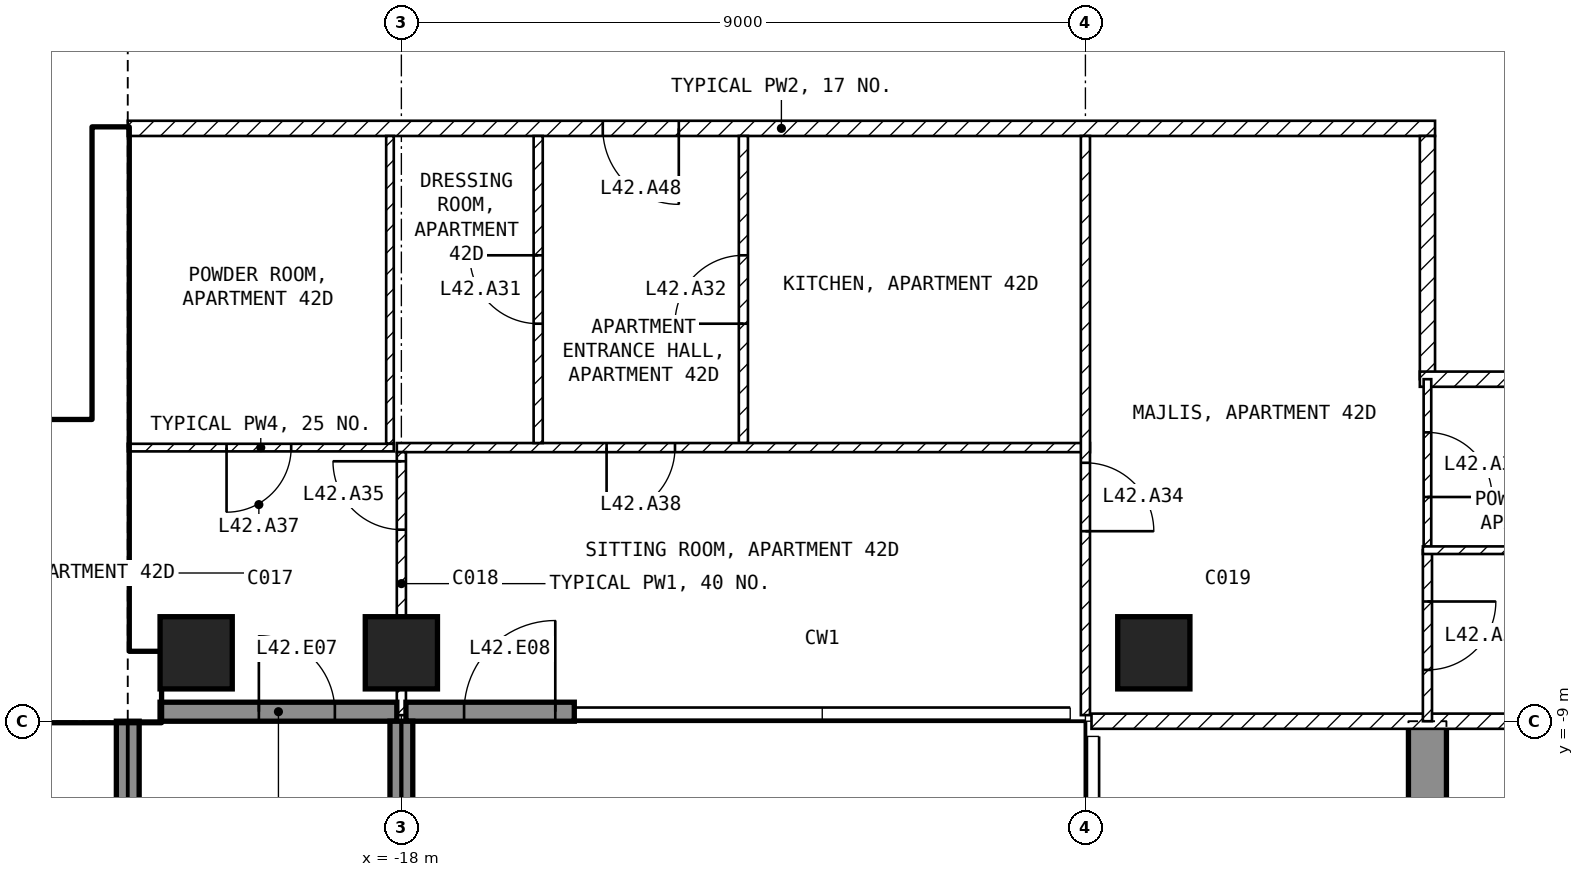
"""IFC4 building model, lengths in metres.
Left out: names, types, materials, properties, quantities, classifications, styles, units other than length and angle.
Written with IfcOpenShell. Run it as: python <this file> out.ifc"""

import sys

from ifc_helpers import new_model, si_unit, direction, frame, frame_2d, origin, origin_2d, place, context, subcontext, project, spatial, polyline, rectangle, outline, extrude, element, fill, save


model = new_model("IFC4")
c1 = context("Model", 3, precision=1e-05, world=origin(), true_north=direction((0.0, 1.0)))
c2 = subcontext(c1, "Body", "Model", "MODEL_VIEW")
j1 = project(units=[si_unit("LENGTHUNIT", "METRE"), si_unit("PLANEANGLEUNIT", "RADIAN")], contexts=[c1])
p1 = place(None, origin())
s1 = spatial("IfcSite", under=j1, at=p1, CompositionType="ELEMENT")
p2 = place(p1, origin())
s2 = spatial("IfcBuilding", under=s1, at=p2, CompositionType="ELEMENT")
p3 = place(p2, frame((0.0, 0.0, 173.6)))
s3 = spatial("IfcBuildingStorey", under=s2, at=p3, CompositionType="ELEMENT", Elevation=173.6)
for number, where, z_axis, x_axis in (
    (1, (-20.7, -8.1, -0.25), (0.0, 0.0, 1.0), (1.0, 0.0, 0.0)),
    (2, (-18.0, -8.1, -0.25), (0.0, 0.0, 1.0), (1.0, 0.0, 0.0)),
    (3, (-8.1, -8.1, -0.25), (0.0, 0.0, 1.0), (1.0, 0.0, 0.0)),
):
    element("IfcColumn", number, at=place(p3, frame(where, z_axis=z_axis, x_axis=x_axis)), inside=s3, PredefinedType="COLUMN", context=c2, shape_type="SweptSolid", body=[
        extrude(rectangle(XDim=0.95, YDim=0.95, at=origin_2d()), origin(), (0.0, 0.0, 1.0), 3.5),
    ])
p4 = place(p3, frame((-4.75, -20.225, -0.25), z_axis=(1.0, 0.0, 0.0), x_axis=(0.0, 1.0, 0.0)))
e4 = element("IfcWall", 4, at=p4, inside=s3, PredefinedType="SHEAR", context=c2, shape_type="SweptSolid", body=[
    extrude(outline(polyline([(0.0, 0.0), (6.725, 0.0), (6.725, 2.65), (9.125, 2.65), (9.125, 0.0), (11.225, 0.0), (11.225, 3.5), (0.0, 3.5), (0.0, 0.0)])), origin(), (0.0, 0.0, 1.0), 0.5),
])
p5 = place(p3, frame((-21.175, -8.875, 0.0), z_axis=(0.0, 0.0, 1.0), x_axis=(1.0, 0.0, 0.0)))
e5 = element("IfcWall", 5, at=p5, inside=s3, PredefinedType="SOLIDWALL", context=c2, shape_type="SweptSolid", body=[
    extrude(rectangle(XDim=3.115, YDim=0.25, at=frame_2d((1.558, 0.0))), origin(), (0.0, 0.0, 1.0), 3.25),
])
p6 = place(p5, frame((1.3, 0.0, 0.0)))
e6 = element("IfcOpeningElement", 6, at=p6, cuts=e5, PredefinedType="OPENING", context=c2, shape_type="SweptSolid", body=[
    extrude(rectangle(XDim=1.0, YDim=2.4, at=frame_2d((0.5, 1.2))), frame((0.0, 0.135, 0.0), z_axis=(0.0, -1.0, 0.0), x_axis=(1.0, 0.0, 0.0)), (0.0, 0.0, 1.0), 0.27),
])
p7 = place(p3, frame((-17.94, -8.875, 0.0), z_axis=(0.0, 0.0, 1.0), x_axis=(1.0, 0.0, 0.0)))
e7 = element("IfcWall", 7, at=p7, inside=s3, PredefinedType="SOLIDWALL", context=c2, shape_type="SweptSolid", body=[
    extrude(rectangle(XDim=2.215, YDim=0.25, at=frame_2d((1.107, 0.0))), origin(), (0.0, 0.0, 1.0), 3.25),
])
p8 = place(p7, frame((0.765, 0.0, 0.0)))
e8 = element("IfcOpeningElement", 8, at=p8, cuts=e7, PredefinedType="OPENING", context=c2, shape_type="SweptSolid", body=[
    extrude(rectangle(XDim=1.2, YDim=2.4, at=frame_2d((0.6, 1.2))), frame((0.0, 0.135, 0.0), z_axis=(0.0, -1.0, 0.0), x_axis=(1.0, 0.0, 0.0)), (0.0, 0.0, 1.0), 0.27),
])
for number, where, z_axis, x_axis in (
    (9, (-21.6, -9.0, 0.0), (0.0, 0.0, 1.0), (0.0, -1.0, 0.0)),
    (10, (-18.0, -9.0, 0.0), (0.0, 0.0, 1.0), (0.0, -1.0, 0.0)),
):
    element("IfcWall", number, at=place(p3, frame(where, z_axis=z_axis, x_axis=x_axis)), inside=s3, PredefinedType="SOLIDWALL", context=c2, shape_type="SweptSolid", body=[
        extrude(rectangle(XDim=2.7, YDim=0.3, at=frame_2d((1.35, 0.0))), origin(), (0.0, 0.0, 1.0), 3.25),
    ])
p9 = place(p3, frame((-30.2, -8.55, 0.0), z_axis=(0.0, 0.0, 1.0), x_axis=(1.0, 0.0, 0.0)))
e11 = element("IfcWall", 11, at=p9, inside=s3, PredefinedType="SHEAR", context=c2, shape_type="SweptSolid", body=[
    extrude(rectangle(XDim=9.025, YDim=0.9, at=frame_2d((4.512, 0.0))), origin(), (0.0, 0.0, 1.0), 3.25),
])
p10 = place(p3, frame((-21.825, -8.1, 0.0), z_axis=(0.0, 0.0, 1.0), x_axis=(0.0, 1.0, 0.0)))
e12 = element("IfcWall", 12, at=p10, inside=s3, PredefinedType="SHEAR", context=c2, shape_type="SweptSolid", body=[
    extrude(rectangle(XDim=6.9, YDim=0.45, at=frame_2d((3.45, 0.0))), origin(), (0.0, 0.0, 1.0), 3.25),
])
p11 = place(p3, frame((-28.35, -5.15, 0.0), z_axis=(0.0, 0.0, 1.0), x_axis=(1.0, 0.0, 0.0)))
e13 = element("IfcWall", 13, at=p11, inside=s3, PredefinedType="SOLIDWALL", context=c2, shape_type="SweptSolid", body=[
    extrude(rectangle(XDim=6.3, YDim=0.2, at=frame_2d((3.15, 0.0))), origin(), (0.0, 0.0, 1.0), 3.25),
])
p12 = place(p11, frame((5.1, 0.0, 0.0)))
e14 = element("IfcOpeningElement", 14, at=p12, cuts=e13, PredefinedType="OPENING", context=c2, shape_type="SweptSolid", body=[
    extrude(rectangle(XDim=1.0, YDim=2.1, at=frame_2d((0.5, 1.05))), frame((0.0, 0.11, 0.0), z_axis=(0.0, -1.0, 0.0), x_axis=(1.0, 0.0, 0.0)), (0.0, 0.0, 1.0), 0.22),
])
p13 = place(p3, frame((-4.4, -1.2, 0.0), z_axis=(0.0, 0.0, 1.0), x_axis=(-1.0, 0.0, 0.0)))
e15 = element("IfcWall", 15, at=p13, inside=s3, PredefinedType="PARTITIONING", context=c2, shape_type="SweptSolid", body=[
    extrude(rectangle(XDim=17.2, YDim=0.2, at=frame_2d((8.6, 0.0))), origin(), (0.0, 0.0, 1.0), 3.25),
])
p14 = place(p13, frame((9.95, 0.0, 0.0)))
e16 = element("IfcOpeningElement", 16, at=p14, cuts=e15, PredefinedType="OPENING", context=c2, shape_type="SweptSolid", body=[
    extrude(rectangle(XDim=1.0, YDim=2.1, at=frame_2d((0.5, 1.05))), frame((0.0, 0.11, 0.0), z_axis=(0.0, -1.0, 0.0), x_axis=(1.0, 0.0, 0.0)), (0.0, 0.0, 1.0), 0.22),
])
p15 = place(p3, frame((-4.5, -4.5, 0.0), z_axis=(0.0, 0.0, 1.0), x_axis=(0.0, 1.0, 0.0)))
e17 = element("IfcWall", 17, at=p15, inside=s3, PredefinedType="PARTITIONING", context=c2, shape_type="SweptSolid", body=[
    extrude(rectangle(XDim=3.2, YDim=0.2, at=frame_2d((1.6, 0.0))), origin(), (0.0, 0.0, 1.0), 3.25),
])
p16 = place(p3, frame((-1.1, -4.5, 0.0), z_axis=(0.0, 0.0, 1.0), x_axis=(-1.0, 0.0, 0.0)))
e18 = element("IfcWall", 18, at=p16, inside=s3, PredefinedType="PARTITIONING", context=c2, shape_type="SweptSolid", body=[
    extrude(rectangle(XDim=3.5, YDim=0.2, at=frame_2d((1.75, 0.0))), origin(), (0.0, 0.0, 1.0), 3.25),
])
p17 = place(p3, frame((8.92, -9.0, 0.0), z_axis=(0.0, 0.0, 1.0), x_axis=(-1.0, 0.0, 0.0)))
e19 = element("IfcWall", 19, at=p17, inside=s3, PredefinedType="PARTITIONING", context=c2, shape_type="SweptSolid", body=[
    extrude(rectangle(XDim=17.84, YDim=0.2, at=frame_2d((8.92, 0.0))), origin(), (0.0, 0.0, 1.0), 3.25),
])
p18 = place(p17, frame((8.42, 0.0, 0.0)))
e20 = element("IfcOpeningElement", 20, at=p18, cuts=e19, PredefinedType="OPENING", context=c2, shape_type="SweptSolid", body=[
    extrude(rectangle(XDim=1.0, YDim=2.1, at=frame_2d((0.5, 1.05))), frame((0.0, 0.11, 0.0), z_axis=(0.0, -1.0, 0.0), x_axis=(1.0, 0.0, 0.0)), (0.0, 0.0, 1.0), 0.22),
])
p19 = place(p3, frame((-13.5, -5.34, 0.0), z_axis=(0.0, 0.0, 1.0), x_axis=(0.0, 1.0, 0.0)))
e21 = element("IfcWall", 21, at=p19, inside=s3, PredefinedType="PARTITIONING", context=c2, shape_type="SweptSolid", body=[
    extrude(rectangle(XDim=4.04, YDim=0.12, at=frame_2d((2.02, 0.0))), origin(), (0.0, 0.0, 1.0), 3.25),
])
p20 = place(p19, frame((1.57, 0.0, 0.0)))
e22 = element("IfcOpeningElement", 22, at=p20, cuts=e21, PredefinedType="OPENING", context=c2, shape_type="SweptSolid", body=[
    extrude(rectangle(XDim=0.9, YDim=2.1, at=frame_2d((0.45, 1.05))), frame((0.0, 0.07, 0.0), z_axis=(0.0, -1.0, 0.0), x_axis=(1.0, 0.0, 0.0)), (0.0, 0.0, 1.0), 0.14),
])
p21 = place(p3, frame((-8.94, -5.4, 0.0), z_axis=(0.0, 0.0, 1.0), x_axis=(-1.0, 0.0, 0.0)))
e23 = element("IfcWall", 23, at=p21, inside=s3, PredefinedType="PARTITIONING", context=c2, shape_type="SweptSolid", body=[
    extrude(rectangle(XDim=9.12, YDim=0.12, at=frame_2d((4.56, 0.0))), origin(), (0.0, 0.0, 1.0), 3.25),
])
p22 = place(p21, frame((5.46, 0.0, 0.0)))
e24 = element("IfcOpeningElement", 24, at=p22, cuts=e23, PredefinedType="OPENING", context=c2, shape_type="SweptSolid", body=[
    extrude(rectangle(XDim=0.9, YDim=2.1, at=frame_2d((0.45, 1.05))), frame((0.0, 0.07, 0.0), z_axis=(0.0, -1.0, 0.0), x_axis=(1.0, 0.0, 0.0)), (0.0, 0.0, 1.0), 0.14),
])
p23 = place(p3, frame((-9.0, -1.3, 0.0), z_axis=(0.0, 0.0, 1.0), x_axis=(0.0, -1.0, 0.0)))
e25 = element("IfcWall", 25, at=p23, inside=s3, PredefinedType="PARTITIONING", context=c2, shape_type="SweptSolid", body=[
    extrude(rectangle(XDim=7.62, YDim=0.12, at=frame_2d((3.81, 0.0))), origin(), (0.0, 0.0, 1.0), 3.25),
])
p24 = place(p23, frame((4.3, 0.0, 0.0)))
e26 = element("IfcOpeningElement", 26, at=p24, cuts=e25, PredefinedType="OPENING", context=c2, shape_type="SweptSolid", body=[
    extrude(rectangle(XDim=0.9, YDim=2.1, at=frame_2d((0.45, 1.05))), frame((0.0, 0.07, 0.0), z_axis=(0.0, -1.0, 0.0), x_axis=(1.0, 0.0, 0.0)), (0.0, 0.0, 1.0), 0.14),
])
p25 = place(p3, frame((-16.2, -5.34, 0.0), z_axis=(0.0, 0.0, 1.0), x_axis=(0.0, 1.0, 0.0)))
e27 = element("IfcWall", 27, at=p25, inside=s3, PredefinedType="PARTITIONING", context=c2, shape_type="SweptSolid", body=[
    extrude(rectangle(XDim=4.04, YDim=0.12, at=frame_2d((2.02, 0.0))), origin(), (0.0, 0.0, 1.0), 3.25),
])
p26 = place(p25, frame((1.57, 0.0, 0.0)))
e28 = element("IfcOpeningElement", 28, at=p26, cuts=e27, PredefinedType="OPENING", context=c2, shape_type="SweptSolid", body=[
    extrude(rectangle(XDim=0.9, YDim=2.1, at=frame_2d((0.45, 1.05))), frame((0.0, 0.07, 0.0), z_axis=(0.0, -1.0, 0.0), x_axis=(1.0, 0.0, 0.0)), (0.0, 0.0, 1.0), 0.14),
])
p27 = place(p3, frame((-18.15, -5.35, 0.0), z_axis=(0.0, 0.0, 1.0), x_axis=(0.0, 1.0, 0.0)))
e29 = element("IfcWall", 29, at=p27, inside=s3, PredefinedType="PARTITIONING", context=c2, shape_type="SweptSolid", body=[
    extrude(rectangle(XDim=4.05, YDim=0.1, at=frame_2d((2.025, 0.0))), origin(), (0.0, 0.0, 1.0), 2.48),
])
p28 = place(p3, frame((-18.1, -5.4, 0.0), z_axis=(0.0, 0.0, 1.0), x_axis=(-1.0, 0.0, 0.0)))
e30 = element("IfcWall", 30, at=p28, inside=s3, PredefinedType="PARTITIONING", context=c2, shape_type="SweptSolid", body=[
    extrude(rectangle(XDim=3.5, YDim=0.1, at=frame_2d((1.75, 0.0))), origin(), (0.0, 0.0, 1.0), 3.25),
])
p29 = place(p28, frame((1.35, 0.0, 0.0)))
e31 = element("IfcOpeningElement", 31, at=p29, cuts=e30, PredefinedType="OPENING", context=c2, shape_type="SweptSolid", body=[
    extrude(rectangle(XDim=0.85, YDim=2.1, at=frame_2d((0.425, 1.05))), frame((0.0, 0.06, 0.0), z_axis=(0.0, -1.0, 0.0), x_axis=(1.0, 0.0, 0.0)), (0.0, 0.0, 1.0), 0.12),
])
p30 = place(p3, frame((-18.0, -8.92, 0.0), z_axis=(0.0, 0.0, 1.0), x_axis=(0.0, 1.0, 0.0)))
e32 = element("IfcWall", 32, at=p30, inside=s3, PredefinedType="PARTITIONING", context=c2, shape_type="SweptSolid", body=[
    extrude(rectangle(XDim=3.46, YDim=0.12, at=frame_2d((1.73, 0.0))), origin(), (0.0, 0.0, 1.0), 2.48),
])
p31 = place(p30, frame((2.44, 0.0, 0.0)))
e33 = element("IfcOpeningElement", 33, at=p31, cuts=e32, PredefinedType="OPENING", context=c2, shape_type="SweptSolid", body=[
    extrude(rectangle(XDim=0.9, YDim=2.1, at=frame_2d((0.45, 1.05))), frame((0.0, 0.07, 0.0), z_axis=(0.0, -1.0, 0.0), x_axis=(1.0, 0.0, 0.0)), (0.0, 0.0, 1.0), 0.14),
])
p32 = place(p3, frame((-4.5, -4.5, 0.0), z_axis=(0.0, 0.0, 1.0), x_axis=(0.0, -1.0, 0.0)))
e34 = element("IfcWall", 34, at=p32, inside=s3, PredefinedType="PARTITIONING", context=c2, shape_type="SweptSolid", body=[
    extrude(rectangle(XDim=2.25, YDim=0.1, at=frame_2d((1.125, 0.0))), origin(), (0.0, 0.0, 1.0), 3.25),
])
p33 = place(p32, frame((0.7, 0.0, 0.0)))
e35 = element("IfcOpeningElement", 35, at=p33, cuts=e34, PredefinedType="OPENING", context=c2, shape_type="SweptSolid", body=[
    extrude(rectangle(XDim=0.85, YDim=2.1, at=frame_2d((0.425, 1.05))), frame((0.0, 0.06, 0.0), z_axis=(0.0, -1.0, 0.0), x_axis=(1.0, 0.0, 0.0)), (0.0, 0.0, 1.0), 0.12),
])
p34 = place(p3, frame((-4.5, -6.75, 0.0), z_axis=(0.0, 0.0, 1.0), x_axis=(0.0, -1.0, 0.0)))
e36 = element("IfcWall", 36, at=p34, inside=s3, PredefinedType="PARTITIONING", context=c2, shape_type="SweptSolid", body=[
    extrude(rectangle(XDim=2.25, YDim=0.12, at=frame_2d((1.125, 0.0))), origin(), (0.0, 0.0, 1.0), 3.25),
])
p35 = place(p34, frame((0.675, 0.0, 0.0)))
e37 = element("IfcOpeningElement", 37, at=p35, cuts=e36, PredefinedType="OPENING", context=c2, shape_type="SweptSolid", body=[
    extrude(rectangle(XDim=0.9, YDim=2.1, at=frame_2d((0.45, 1.05))), frame((0.0, 0.07, 0.0), z_axis=(0.0, -1.0, 0.0), x_axis=(1.0, 0.0, 0.0)), (0.0, 0.0, 1.0), 0.14),
])
p36 = place(p3, frame((-1.1, -6.75, 0.0), z_axis=(0.0, 0.0, 1.0), x_axis=(-1.0, 0.0, 0.0)))
e38 = element("IfcWall", 38, at=p36, inside=s3, PredefinedType="PARTITIONING", context=c2, shape_type="SweptSolid", body=[
    extrude(rectangle(XDim=3.46, YDim=0.1, at=frame_2d((1.73, 0.0))), origin(), (0.0, 0.0, 1.0), 3.25),
])
p37 = place(p6, origin())
e39 = element("IfcDoor", 39, at=p37, inside=s3, OperationType="SINGLE_SWING_LEFT", PredefinedType="DOOR", context=c2, shape_type="SweptSolid", body=[
    extrude(rectangle(XDim=1.0, YDim=2.4, at=frame_2d((0.5, 1.2))), frame((0.0, 0.025, 0.0), z_axis=(0.0, -1.0, 0.0), x_axis=(1.0, 0.0, 0.0)), (0.0, 0.0, 1.0), 0.05),
])
fill(e6, e39)
p38 = place(p8, origin())
e40 = element("IfcDoor", 40, at=p38, inside=s3, OperationType="SINGLE_SWING_RIGHT", PredefinedType="DOOR", context=c2, shape_type="SweptSolid", body=[
    extrude(rectangle(XDim=1.2, YDim=2.4, at=frame_2d((0.6, 1.2))), frame((0.0, 0.025, 0.0), z_axis=(0.0, -1.0, 0.0), x_axis=(1.0, 0.0, 0.0)), (0.0, 0.0, 1.0), 0.05),
])
fill(e8, e40)
p39 = place(p12, origin())
e41 = element("IfcDoor", 41, at=p39, inside=s3, OperationType="SINGLE_SWING_LEFT", PredefinedType="DOOR", context=c2, shape_type="SweptSolid", body=[
    extrude(rectangle(XDim=1.0, YDim=2.1, at=frame_2d((0.5, 1.05))), frame((0.0, 0.025, 0.0), z_axis=(0.0, -1.0, 0.0), x_axis=(1.0, 0.0, 0.0)), (0.0, 0.0, 1.0), 0.05),
])
fill(e14, e41)
p40 = place(p26, origin())
e42 = element("IfcDoor", 42, at=p40, inside=s3, OperationType="SINGLE_SWING_RIGHT", PredefinedType="DOOR", context=c2, shape_type="SweptSolid", body=[
    extrude(rectangle(XDim=0.9, YDim=2.1, at=frame_2d((0.45, 1.05))), frame((0.0, 0.025, 0.0), z_axis=(0.0, -1.0, 0.0), x_axis=(1.0, 0.0, 0.0)), (0.0, 0.0, 1.0), 0.05),
])
fill(e28, e42)
p41 = place(p20, origin())
e43 = element("IfcDoor", 43, at=p41, inside=s3, OperationType="SINGLE_SWING_LEFT", PredefinedType="DOOR", context=c2, shape_type="SweptSolid", body=[
    extrude(rectangle(XDim=0.9, YDim=2.1, at=frame_2d((0.45, 1.05))), frame((0.0, 0.025, 0.0), z_axis=(0.0, -1.0, 0.0), x_axis=(1.0, 0.0, 0.0)), (0.0, 0.0, 1.0), 0.05),
])
fill(e22, e43)
p42 = place(p35, origin())
e44 = element("IfcDoor", 44, at=p42, inside=s3, OperationType="SINGLE_SWING_LEFT", PredefinedType="DOOR", context=c2, shape_type="SweptSolid", body=[
    extrude(rectangle(XDim=0.9, YDim=2.1, at=frame_2d((0.45, 1.05))), frame((0.0, 0.025, 0.0), z_axis=(0.0, -1.0, 0.0), x_axis=(1.0, 0.0, 0.0)), (0.0, 0.0, 1.0), 0.05),
])
fill(e37, e44)
p43 = place(p24, origin())
e45 = element("IfcDoor", 45, at=p43, inside=s3, OperationType="SINGLE_SWING_RIGHT", PredefinedType="DOOR", context=c2, shape_type="SweptSolid", body=[
    extrude(rectangle(XDim=0.9, YDim=2.1, at=frame_2d((0.45, 1.05))), frame((0.0, 0.025, 0.0), z_axis=(0.0, -1.0, 0.0), x_axis=(1.0, 0.0, 0.0)), (0.0, 0.0, 1.0), 0.05),
])
fill(e26, e45)
p44 = place(p31, origin())
e46 = element("IfcDoor", 46, at=p44, inside=s3, OperationType="SINGLE_SWING_RIGHT", PredefinedType="DOOR", context=c2, shape_type="SweptSolid", body=[
    extrude(rectangle(XDim=0.9, YDim=2.1, at=frame_2d((0.45, 1.05))), frame((0.0, 0.025, 0.0), z_axis=(0.0, -1.0, 0.0), x_axis=(1.0, 0.0, 0.0)), (0.0, 0.0, 1.0), 0.05),
])
fill(e33, e46)
p45 = place(p33, origin())
e47 = element("IfcDoor", 47, at=p45, inside=s3, OperationType="SINGLE_SWING_RIGHT", PredefinedType="DOOR", context=c2, shape_type="SweptSolid", body=[
    extrude(rectangle(XDim=0.85, YDim=2.1, at=frame_2d((0.425, 1.05))), frame((0.0, 0.025, 0.0), z_axis=(0.0, -1.0, 0.0), x_axis=(1.0, 0.0, 0.0)), (0.0, 0.0, 1.0), 0.05),
])
fill(e35, e47)
p46 = place(p29, origin())
e48 = element("IfcDoor", 48, at=p46, inside=s3, OperationType="SINGLE_SWING_RIGHT", PredefinedType="DOOR", context=c2, shape_type="SweptSolid", body=[
    extrude(rectangle(XDim=0.85, YDim=2.1, at=frame_2d((0.425, 1.05))), frame((0.0, 0.025, 0.0), z_axis=(0.0, -1.0, 0.0), x_axis=(1.0, 0.0, 0.0)), (0.0, 0.0, 1.0), 0.05),
])
fill(e31, e48)
p47 = place(p22, origin())
e49 = element("IfcDoor", 49, at=p47, inside=s3, OperationType="SINGLE_SWING_RIGHT", PredefinedType="DOOR", context=c2, shape_type="SweptSolid", body=[
    extrude(rectangle(XDim=0.9, YDim=2.1, at=frame_2d((0.45, 1.05))), frame((0.0, 0.025, 0.0), z_axis=(0.0, -1.0, 0.0), x_axis=(1.0, 0.0, 0.0)), (0.0, 0.0, 1.0), 0.05),
])
fill(e24, e49)
p48 = place(p14, origin())
e50 = element("IfcDoor", 50, at=p48, inside=s3, OperationType="SINGLE_SWING_LEFT", PredefinedType="DOOR", context=c2, shape_type="SweptSolid", body=[
    extrude(rectangle(XDim=1.0, YDim=2.1, at=frame_2d((0.5, 1.05))), frame((0.0, 0.025, 0.0), z_axis=(0.0, -1.0, 0.0), x_axis=(1.0, 0.0, 0.0)), (0.0, 0.0, 1.0), 0.05),
])
fill(e16, e50)
save(model, sys.argv[1])
